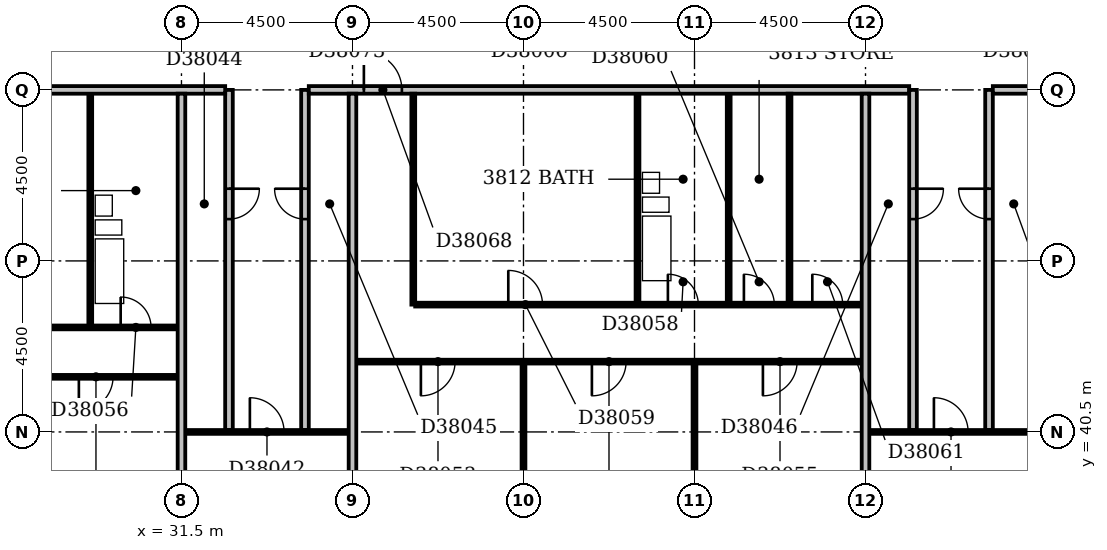
"""IFC4 building model, lengths in metres.
Left out: names, types, materials, properties, quantities, classifications, styles, units other than length and angle.
Written with IfcOpenShell. Run it as: python <this file> out.ifc"""

import sys

from ifc_helpers import new_model, si_unit, direction, frame, frame_2d, origin, place, context, subcontext, project, spatial, rectangle, extrude, element, fill, save


model = new_model("IFC4")
c1 = context("Model", 3, precision=1e-05, world=origin(), true_north=direction((0.0, 1.0)))
c2 = subcontext(c1, "Body", "Model", "MODEL_VIEW")
j1 = project(units=[si_unit("LENGTHUNIT", "METRE"), si_unit("PLANEANGLEUNIT", "RADIAN")], contexts=[c1])
p1 = place(None, origin())
s1 = spatial("IfcSite", under=j1, at=p1, CompositionType="ELEMENT")
p2 = place(p1, origin())
s2 = spatial("IfcBuilding", under=s1, at=p2, CompositionType="ELEMENT")
p3 = place(p2, frame((0.0, 0.0, 152.0)))
s3 = spatial("IfcBuildingStorey", under=s2, at=p3, CompositionType="ELEMENT", Elevation=152.0)
p4 = place(p3, frame((31.5, 36.5, 0.0), z_axis=(0.0, 0.0, 1.0), x_axis=(0.0, 1.0, 0.0)))
e1 = element("IfcWall", 1, at=p4, inside=s3, PredefinedType="PARTITIONING", context=c2, shape_type="SweptSolid", body=[
    extrude(rectangle(XDim=12.9, YDim=0.2, at=frame_2d((6.45, 0.0))), origin(), (0.0, 0.0, 1.0), 3.3),
])
p5 = place(p3, frame((36.0, 36.5, 0.0), z_axis=(0.0, 0.0, 1.0), x_axis=(0.0, 1.0, 0.0)))
e2 = element("IfcWall", 2, at=p5, inside=s3, PredefinedType="PARTITIONING", context=c2, shape_type="SweptSolid", body=[
    extrude(rectangle(XDim=12.9, YDim=0.2, at=frame_2d((6.45, 0.0))), origin(), (0.0, 0.0, 1.0), 2.4),
])
p6 = place(p3, frame((40.5, 36.5, 0.0), z_axis=(0.0, 0.0, 1.0), x_axis=(0.0, 1.0, 0.0)))
e3 = element("IfcWall", 3, at=p6, inside=s3, PredefinedType="PARTITIONING", context=c2, shape_type="SweptSolid", body=[
    extrude(rectangle(XDim=5.8, YDim=0.1, at=frame_2d((2.9, 0.0))), origin(), (0.0, 0.0, 1.0), 3.3),
])
p7 = place(p3, frame((45.0, 36.5, 0.0), z_axis=(0.0, 0.0, 1.0), x_axis=(0.0, 1.0, 0.0)))
e4 = element("IfcWall", 4, at=p7, inside=s3, PredefinedType="PARTITIONING", context=c2, shape_type="SweptSolid", body=[
    extrude(rectangle(XDim=5.8, YDim=0.1, at=frame_2d((2.9, 0.0))), origin(), (0.0, 0.0, 1.0), 2.6),
])
p8 = place(p3, frame((49.5, 36.5, 0.0), z_axis=(0.0, 0.0, 1.0), x_axis=(0.0, 1.0, 0.0)))
e5 = element("IfcWall", 5, at=p8, inside=s3, PredefinedType="PARTITIONING", context=c2, shape_type="SweptSolid", body=[
    extrude(rectangle(XDim=12.9, YDim=0.2, at=frame_2d((6.45, 0.0))), origin(), (0.0, 0.0, 1.0), 3.3),
])
p9 = place(p3, frame((31.6, 40.5, 0.0), z_axis=(0.0, 0.0, 1.0), x_axis=(1.0, 0.0, 0.0)))
e6 = element("IfcWall", 6, at=p9, inside=s3, PredefinedType="PARTITIONING", context=c2, shape_type="SweptSolid", body=[
    extrude(rectangle(XDim=4.3, YDim=0.1, at=frame_2d((2.15, 0.0))), origin(), (0.0, 0.0, 1.0), 3.3),
])
p10 = place(p9, frame((1.7, 0.0, 0.0)))
e7 = element("IfcOpeningElement", 7, at=p10, cuts=e6, PredefinedType="OPENING", context=c2, shape_type="SweptSolid", body=[
    extrude(rectangle(XDim=0.9, YDim=2.1, at=frame_2d((0.45, 1.05))), frame((0.0, 0.062, 0.0), z_axis=(0.0, -1.0, 0.0), x_axis=(1.0, 0.0, 0.0)), (0.0, 0.0, 1.0), 0.124),
])
p11 = place(p3, frame((49.6, 40.5, 0.0), z_axis=(0.0, 0.0, 1.0), x_axis=(1.0, 0.0, 0.0)))
e8 = element("IfcWall", 8, at=p11, inside=s3, PredefinedType="PARTITIONING", context=c2, shape_type="SweptSolid", body=[
    extrude(rectangle(XDim=4.3, YDim=0.1, at=frame_2d((2.15, 0.0))), origin(), (0.0, 0.0, 1.0), 3.3),
])
p12 = place(p11, frame((1.7, 0.0, 0.0)))
e9 = element("IfcOpeningElement", 9, at=p12, cuts=e8, PredefinedType="OPENING", context=c2, shape_type="SweptSolid", body=[
    extrude(rectangle(XDim=0.9, YDim=2.1, at=frame_2d((0.45, 1.05))), frame((0.0, 0.062, 0.0), z_axis=(0.0, -1.0, 0.0), x_axis=(1.0, 0.0, 0.0)), (0.0, 0.0, 1.0), 0.124),
])
p13 = place(p3, frame((32.75, 40.55, 0.0), z_axis=(0.0, 0.0, 1.0), x_axis=(0.0, 1.0, 0.0)))
e10 = element("IfcWall", 10, at=p13, inside=s3, PredefinedType="PARTITIONING", context=c2, shape_type="SweptSolid", body=[
    extrude(rectangle(XDim=8.95, YDim=0.2, at=frame_2d((4.475, 0.0))), origin(), (0.0, 0.0, 1.0), 3.3),
])
p14 = place(p13, frame((5.55, 0.0, 0.0)))
e11 = element("IfcOpeningElement", 11, at=p14, cuts=e10, PredefinedType="OPENING", context=c2, shape_type="SweptSolid", body=[
    extrude(rectangle(XDim=0.8, YDim=2.1, at=frame_2d((0.4, 1.05))), frame((0.0, 0.112, 0.0), z_axis=(0.0, -1.0, 0.0), x_axis=(1.0, 0.0, 0.0)), (0.0, 0.0, 1.0), 0.224),
])
p15 = place(p3, frame((34.75, 40.55, 0.0), z_axis=(0.0, 0.0, 1.0), x_axis=(0.0, 1.0, 0.0)))
e12 = element("IfcWall", 12, at=p15, inside=s3, PredefinedType="PARTITIONING", context=c2, shape_type="SweptSolid", body=[
    extrude(rectangle(XDim=8.95, YDim=0.2, at=frame_2d((4.475, 0.0))), origin(), (0.0, 0.0, 1.0), 3.3),
])
p16 = place(p15, frame((5.55, 0.0, 0.0)))
e13 = element("IfcOpeningElement", 13, at=p16, cuts=e12, PredefinedType="OPENING", context=c2, shape_type="SweptSolid", body=[
    extrude(rectangle(XDim=0.8, YDim=2.1, at=frame_2d((0.4, 1.05))), frame((0.0, 0.112, 0.0), z_axis=(0.0, -1.0, 0.0), x_axis=(1.0, 0.0, 0.0)), (0.0, 0.0, 1.0), 0.224),
])
p17 = place(p3, frame((50.75, 40.55, 0.0), z_axis=(0.0, 0.0, 1.0), x_axis=(0.0, 1.0, 0.0)))
e14 = element("IfcWall", 14, at=p17, inside=s3, PredefinedType="PARTITIONING", context=c2, shape_type="SweptSolid", body=[
    extrude(rectangle(XDim=8.95, YDim=0.2, at=frame_2d((4.475, 0.0))), origin(), (0.0, 0.0, 1.0), 3.3),
])
p18 = place(p17, frame((5.55, 0.0, 0.0)))
e15 = element("IfcOpeningElement", 15, at=p18, cuts=e14, PredefinedType="OPENING", context=c2, shape_type="SweptSolid", body=[
    extrude(rectangle(XDim=0.8, YDim=2.1, at=frame_2d((0.4, 1.05))), frame((0.0, 0.112, 0.0), z_axis=(0.0, -1.0, 0.0), x_axis=(1.0, 0.0, 0.0)), (0.0, 0.0, 1.0), 0.224),
])
p19 = place(p3, frame((52.75, 40.55, 0.0), z_axis=(0.0, 0.0, 1.0), x_axis=(0.0, 1.0, 0.0)))
e16 = element("IfcWall", 16, at=p19, inside=s3, PredefinedType="PARTITIONING", context=c2, shape_type="SweptSolid", body=[
    extrude(rectangle(XDim=8.95, YDim=0.2, at=frame_2d((4.475, 0.0))), origin(), (0.0, 0.0, 1.0), 3.3),
])
p20 = place(p19, frame((5.55, 0.0, 0.0)))
e17 = element("IfcOpeningElement", 17, at=p20, cuts=e16, PredefinedType="OPENING", context=c2, shape_type="SweptSolid", body=[
    extrude(rectangle(XDim=0.8, YDim=2.1, at=frame_2d((0.4, 1.05))), frame((0.0, 0.112, 0.0), z_axis=(0.0, -1.0, 0.0), x_axis=(1.0, 0.0, 0.0)), (0.0, 0.0, 1.0), 0.224),
])
p21 = place(p3, frame((22.6, 41.95, 0.0), z_axis=(0.0, 0.0, 1.0), x_axis=(1.0, 0.0, 0.0)))
e18 = element("IfcWall", 18, at=p21, inside=s3, PredefinedType="PARTITIONING", context=c2, shape_type="SweptSolid", body=[
    extrude(rectangle(XDim=8.8, YDim=0.1, at=frame_2d((4.4, 0.0))), origin(), (0.0, 0.0, 1.0), 3.3),
])
p22 = place(p21, frame((1.7, 0.0, 0.0)))
e19 = element("IfcOpeningElement", 19, at=p22, cuts=e18, PredefinedType="OPENING", context=c2, shape_type="SweptSolid", body=[
    extrude(rectangle(XDim=0.9, YDim=2.1, at=frame_2d((0.45, 1.05))), frame((0.0, 0.062, 0.0), z_axis=(0.0, -1.0, 0.0), x_axis=(1.0, 0.0, 0.0)), (0.0, 0.0, 1.0), 0.124),
])
p23 = place(p21, frame((6.2, 0.0, 0.0)))
e20 = element("IfcOpeningElement", 20, at=p23, cuts=e18, PredefinedType="OPENING", context=c2, shape_type="SweptSolid", body=[
    extrude(rectangle(XDim=0.9, YDim=2.1, at=frame_2d((0.45, 1.05))), frame((0.0, 0.062, 0.0), z_axis=(0.0, -1.0, 0.0), x_axis=(1.0, 0.0, 0.0)), (0.0, 0.0, 1.0), 0.124),
])
p24 = place(p3, frame((36.1, 42.35, 0.0), z_axis=(0.0, 0.0, 1.0), x_axis=(1.0, 0.0, 0.0)))
e21 = element("IfcWall", 21, at=p24, inside=s3, PredefinedType="PARTITIONING", context=c2, shape_type="SweptSolid", body=[
    extrude(rectangle(XDim=13.3, YDim=0.1, at=frame_2d((6.65, 0.0))), origin(), (0.0, 0.0, 1.0), 3.3),
])
p25 = place(p24, frame((1.7, 0.0, 0.0)))
e22 = element("IfcOpeningElement", 22, at=p25, cuts=e21, PredefinedType="OPENING", context=c2, shape_type="SweptSolid", body=[
    extrude(rectangle(XDim=0.9, YDim=2.1, at=frame_2d((0.45, 1.05))), frame((0.0, 0.062, 0.0), z_axis=(0.0, -1.0, 0.0), x_axis=(1.0, 0.0, 0.0)), (0.0, 0.0, 1.0), 0.124),
])
p26 = place(p24, frame((6.2, 0.0, 0.0)))
e23 = element("IfcOpeningElement", 23, at=p26, cuts=e21, PredefinedType="OPENING", context=c2, shape_type="SweptSolid", body=[
    extrude(rectangle(XDim=0.9, YDim=2.1, at=frame_2d((0.45, 1.05))), frame((0.0, 0.062, 0.0), z_axis=(0.0, -1.0, 0.0), x_axis=(1.0, 0.0, 0.0)), (0.0, 0.0, 1.0), 0.124),
])
p27 = place(p24, frame((10.7, 0.0, 0.0)))
e24 = element("IfcOpeningElement", 24, at=p27, cuts=e21, PredefinedType="OPENING", context=c2, shape_type="SweptSolid", body=[
    extrude(rectangle(XDim=0.9, YDim=2.1, at=frame_2d((0.45, 1.05))), frame((0.0, 0.062, 0.0), z_axis=(0.0, -1.0, 0.0), x_axis=(1.0, 0.0, 0.0)), (0.0, 0.0, 1.0), 0.124),
])
p28 = place(p3, frame((24.15, 43.25, 0.0), z_axis=(0.0, 0.0, 1.0), x_axis=(1.0, 0.0, 0.0)))
e25 = element("IfcWall", 25, at=p28, inside=s3, PredefinedType="PARTITIONING", context=c2, shape_type="SweptSolid", body=[
    extrude(rectangle(XDim=7.25, YDim=0.1, at=frame_2d((3.625, 0.0))), origin(), (0.0, 0.0, 1.0), 3.3),
])
p29 = place(p28, frame((5.75, 0.0, 0.0)))
e26 = element("IfcOpeningElement", 26, at=p29, cuts=e25, PredefinedType="OPENING", context=c2, shape_type="SweptSolid", body=[
    extrude(rectangle(XDim=0.8, YDim=2.1, at=frame_2d((0.4, 1.05))), frame((0.0, 0.062, 0.0), z_axis=(0.0, -1.0, 0.0), x_axis=(1.0, 0.0, 0.0)), (0.0, 0.0, 1.0), 0.124),
])
p30 = place(p28, frame((2.0, 0.0, 0.0)))
e27 = element("IfcOpeningElement", 27, at=p30, cuts=e25, PredefinedType="OPENING", context=c2, shape_type="SweptSolid", body=[
    extrude(rectangle(XDim=0.9, YDim=2.1, at=frame_2d((0.45, 1.05))), frame((0.0, 0.062, 0.0), z_axis=(0.0, -1.0, 0.0), x_axis=(1.0, 0.0, 0.0)), (0.0, 0.0, 1.0), 0.124),
])
p31 = place(p3, frame((29.1, 43.3, 0.0), z_axis=(0.0, 0.0, 1.0), x_axis=(0.0, 1.0, 0.0)))
e28 = element("IfcWall", 28, at=p31, inside=s3, PredefinedType="PLUMBINGWALL", context=c2, shape_type="SweptSolid", body=[
    extrude(rectangle(XDim=6.1, YDim=0.1, at=frame_2d((3.05, 0.0))), origin(), (0.0, 0.0, 1.0), 3.3),
])
p32 = place(p3, frame((37.6, 43.85, 0.0), z_axis=(0.0, 0.0, 1.0), x_axis=(0.0, 1.0, 0.0)))
e29 = element("IfcWall", 29, at=p32, inside=s3, PredefinedType="PARTITIONING", context=c2, shape_type="SweptSolid", body=[
    extrude(rectangle(XDim=5.55, YDim=0.1, at=frame_2d((2.775, 0.0))), origin(), (0.0, 0.0, 1.0), 3.3),
])
p33 = place(p3, frame((37.65, 43.85, 0.0), z_axis=(0.0, 0.0, 1.0), x_axis=(1.0, 0.0, 0.0)))
e30 = element("IfcWall", 30, at=p33, inside=s3, PredefinedType="PARTITIONING", context=c2, shape_type="SweptSolid", body=[
    extrude(rectangle(XDim=11.75, YDim=0.1, at=frame_2d((5.875, 0.0))), origin(), (0.0, 0.0, 1.0), 3.3),
])
p34 = place(p33, frame((6.65, 0.0, 0.0)))
e31 = element("IfcOpeningElement", 31, at=p34, cuts=e30, PredefinedType="OPENING", context=c2, shape_type="SweptSolid", body=[
    extrude(rectangle(XDim=0.8, YDim=2.1, at=frame_2d((0.4, 1.05))), frame((0.0, 0.062, 0.0), z_axis=(0.0, -1.0, 0.0), x_axis=(1.0, 0.0, 0.0)), (0.0, 0.0, 1.0), 0.124),
])
p35 = place(p33, frame((2.45, 0.0, 0.0)))
e32 = element("IfcOpeningElement", 32, at=p35, cuts=e30, PredefinedType="OPENING", context=c2, shape_type="SweptSolid", body=[
    extrude(rectangle(XDim=0.9, YDim=2.1, at=frame_2d((0.45, 1.05))), frame((0.0, 0.062, 0.0), z_axis=(0.0, -1.0, 0.0), x_axis=(1.0, 0.0, 0.0)), (0.0, 0.0, 1.0), 0.124),
])
p36 = place(p33, frame((8.65, 0.0, 0.0)))
e33 = element("IfcOpeningElement", 33, at=p36, cuts=e30, PredefinedType="OPENING", context=c2, shape_type="SweptSolid", body=[
    extrude(rectangle(XDim=0.8, YDim=2.1, at=frame_2d((0.4, 1.05))), frame((0.0, 0.062, 0.0), z_axis=(0.0, -1.0, 0.0), x_axis=(1.0, 0.0, 0.0)), (0.0, 0.0, 1.0), 0.124),
])
p37 = place(p33, frame((10.45, 0.0, 0.0)))
e34 = element("IfcOpeningElement", 34, at=p37, cuts=e30, PredefinedType="OPENING", context=c2, shape_type="SweptSolid", body=[
    extrude(rectangle(XDim=0.8, YDim=2.1, at=frame_2d((0.4, 1.05))), frame((0.0, 0.062, 0.0), z_axis=(0.0, -1.0, 0.0), x_axis=(1.0, 0.0, 0.0)), (0.0, 0.0, 1.0), 0.124),
])
for number, where, z_axis, x_axis in (
    (35, (43.5, 43.9, 0.0), (0.0, 0.0, 1.0), (0.0, 1.0, 0.0)),
    (36, (45.9, 43.9, 0.0), (0.0, 0.0, 1.0), (0.0, 1.0, 0.0)),
):
    element("IfcWall", number, at=place(p3, frame(where, z_axis=z_axis, x_axis=x_axis)), inside=s3, PredefinedType="PLUMBINGWALL", context=c2, shape_type="SweptSolid", body=[
        extrude(rectangle(XDim=5.5, YDim=0.1, at=frame_2d((2.75, 0.0))), origin(), (0.0, 0.0, 1.0), 3.3),
    ])
p38 = place(p3, frame((47.5, 43.9, 0.0), z_axis=(0.0, 0.0, 1.0), x_axis=(0.0, 1.0, 0.0)))
e37 = element("IfcWall", 37, at=p38, inside=s3, PredefinedType="PARTITIONING", context=c2, shape_type="SweptSolid", body=[
    extrude(rectangle(XDim=5.5, YDim=0.1, at=frame_2d((2.75, 0.0))), origin(), (0.0, 0.0, 1.0), 3.3),
])
p39 = place(p3, frame((9.1, 49.5, 0.0), z_axis=(0.0, 0.0, 1.0), x_axis=(1.0, 0.0, 0.0)))
e38 = element("IfcWall", 38, at=p39, inside=s3, PredefinedType="PARTITIONING", context=c2, shape_type="SweptSolid", body=[
    extrude(rectangle(XDim=23.55, YDim=0.2, at=frame_2d((11.775, 0.0))), origin(), (0.0, 0.0, 1.0), 3.3),
])
p40 = place(p39, frame((13.7, 0.0, 0.0)))
e39 = element("IfcOpeningElement", 39, at=p40, cuts=e38, PredefinedType="OPENING", context=c2, shape_type="SweptSolid", body=[
    extrude(rectangle(XDim=1.0, YDim=2.1, at=frame_2d((0.5, 1.05))), frame((0.0, 0.112, 0.0), z_axis=(0.0, -1.0, 0.0), x_axis=(1.0, 0.0, 0.0)), (0.0, 0.0, 1.0), 0.224),
])
p41 = place(p39, frame((10.65, 0.0, 0.0)))
e40 = element("IfcOpeningElement", 40, at=p41, cuts=e38, PredefinedType="OPENING", context=c2, shape_type="SweptSolid", body=[
    extrude(rectangle(XDim=0.9, YDim=2.1, at=frame_2d((0.45, 1.05))), frame((0.0, 0.112, 0.0), z_axis=(0.0, -1.0, 0.0), x_axis=(1.0, 0.0, 0.0)), (0.0, 0.0, 1.0), 0.224),
])
p42 = place(p3, frame((34.85, 49.5, 0.0), z_axis=(0.0, 0.0, 1.0), x_axis=(1.0, 0.0, 0.0)))
e41 = element("IfcWall", 41, at=p42, inside=s3, PredefinedType="PARTITIONING", context=c2, shape_type="SweptSolid", body=[
    extrude(rectangle(XDim=15.8, YDim=0.2, at=frame_2d((7.9, 0.0))), origin(), (0.0, 0.0, 1.0), 3.3),
])
p43 = place(p42, frame((1.45, 0.0, 0.0)))
e42 = element("IfcOpeningElement", 42, at=p43, cuts=e41, PredefinedType="OPENING", context=c2, shape_type="SweptSolid", body=[
    extrude(rectangle(XDim=1.0, YDim=2.1, at=frame_2d((0.5, 1.05))), frame((0.0, 0.112, 0.0), z_axis=(0.0, -1.0, 0.0), x_axis=(1.0, 0.0, 0.0)), (0.0, 0.0, 1.0), 0.224),
])
p44 = place(p3, frame((52.85, 49.5, 0.0), z_axis=(0.0, 0.0, 1.0), x_axis=(1.0, 0.0, 0.0)))
e43 = element("IfcWall", 43, at=p44, inside=s3, PredefinedType="PARTITIONING", context=c2, shape_type="SweptSolid", body=[
    extrude(rectangle(XDim=14.15, YDim=0.2, at=frame_2d((7.075, 0.0))), origin(), (0.0, 0.0, 1.0), 3.3),
])
p45 = place(p44, frame((1.45, 0.0, 0.0)))
e44 = element("IfcOpeningElement", 44, at=p45, cuts=e43, PredefinedType="OPENING", context=c2, shape_type="SweptSolid", body=[
    extrude(rectangle(XDim=1.0, YDim=2.1, at=frame_2d((0.5, 1.05))), frame((0.0, 0.112, 0.0), z_axis=(0.0, -1.0, 0.0), x_axis=(1.0, 0.0, 0.0)), (0.0, 0.0, 1.0), 0.224),
])
p46 = place(p10, origin())
e45 = element("IfcDoor", 45, at=p46, inside=s3, OperationType="SINGLE_SWING_LEFT", PredefinedType="DOOR", context=c2, shape_type="SweptSolid", body=[
    extrude(rectangle(XDim=0.9, YDim=2.1, at=frame_2d((0.45, 1.05))), frame((0.0, 0.025, 0.0), z_axis=(0.0, -1.0, 0.0), x_axis=(1.0, 0.0, 0.0)), (0.0, 0.0, 1.0), 0.05),
])
fill(e7, e45)
p47 = place(p12, origin())
e46 = element("IfcDoor", 46, at=p47, inside=s3, OperationType="SINGLE_SWING_LEFT", PredefinedType="DOOR", context=c2, shape_type="SweptSolid", body=[
    extrude(rectangle(XDim=0.9, YDim=2.1, at=frame_2d((0.45, 1.05))), frame((0.0, 0.025, 0.0), z_axis=(0.0, -1.0, 0.0), x_axis=(1.0, 0.0, 0.0)), (0.0, 0.0, 1.0), 0.05),
])
fill(e9, e46)
p48 = place(p14, origin())
e47 = element("IfcDoor", 47, at=p48, inside=s3, OperationType="SINGLE_SWING_RIGHT", PredefinedType="DOOR", context=c2, shape_type="SweptSolid", body=[
    extrude(rectangle(XDim=0.8, YDim=2.1, at=frame_2d((0.4, 1.05))), frame((0.0, 0.025, 0.0), z_axis=(0.0, -1.0, 0.0), x_axis=(1.0, 0.0, 0.0)), (0.0, 0.0, 1.0), 0.05),
])
fill(e11, e47)
p49 = place(p16, frame((0.8, 0.0, 0.0), z_axis=(0.0, 0.0, 1.0), x_axis=(-1.0, 0.0, 0.0)))
e48 = element("IfcDoor", 48, at=p49, inside=s3, OperationType="SINGLE_SWING_LEFT", PredefinedType="DOOR", context=c2, shape_type="SweptSolid", body=[
    extrude(rectangle(XDim=0.8, YDim=2.1, at=frame_2d((0.4, 1.05))), frame((0.0, 0.025, 0.0), z_axis=(0.0, -1.0, 0.0), x_axis=(1.0, 0.0, 0.0)), (0.0, 0.0, 1.0), 0.05),
])
fill(e13, e48)
p50 = place(p18, origin())
e49 = element("IfcDoor", 49, at=p50, inside=s3, OperationType="SINGLE_SWING_RIGHT", PredefinedType="DOOR", context=c2, shape_type="SweptSolid", body=[
    extrude(rectangle(XDim=0.8, YDim=2.1, at=frame_2d((0.4, 1.05))), frame((0.0, 0.025, 0.0), z_axis=(0.0, -1.0, 0.0), x_axis=(1.0, 0.0, 0.0)), (0.0, 0.0, 1.0), 0.05),
])
fill(e15, e49)
p51 = place(p20, frame((0.8, 0.0, 0.0), z_axis=(0.0, 0.0, 1.0), x_axis=(-1.0, 0.0, 0.0)))
e50 = element("IfcDoor", 50, at=p51, inside=s3, OperationType="SINGLE_SWING_LEFT", PredefinedType="DOOR", context=c2, shape_type="SweptSolid", body=[
    extrude(rectangle(XDim=0.8, YDim=2.1, at=frame_2d((0.4, 1.05))), frame((0.0, 0.025, 0.0), z_axis=(0.0, -1.0, 0.0), x_axis=(1.0, 0.0, 0.0)), (0.0, 0.0, 1.0), 0.05),
])
fill(e17, e50)
p52 = place(p23, frame((0.9, 0.0, 0.0), z_axis=(0.0, 0.0, 1.0), x_axis=(-1.0, 0.0, 0.0)))
e51 = element("IfcDoor", 51, at=p52, inside=s3, OperationType="SINGLE_SWING_RIGHT", PredefinedType="DOOR", context=c2, shape_type="SweptSolid", body=[
    extrude(rectangle(XDim=0.9, YDim=2.1, at=frame_2d((0.45, 1.05))), frame((0.0, 0.025, 0.0), z_axis=(0.0, -1.0, 0.0), x_axis=(1.0, 0.0, 0.0)), (0.0, 0.0, 1.0), 0.05),
])
fill(e20, e51)
p53 = place(p25, frame((0.9, 0.0, 0.0), z_axis=(0.0, 0.0, 1.0), x_axis=(-1.0, 0.0, 0.0)))
e52 = element("IfcDoor", 52, at=p53, inside=s3, OperationType="SINGLE_SWING_RIGHT", PredefinedType="DOOR", context=c2, shape_type="SweptSolid", body=[
    extrude(rectangle(XDim=0.9, YDim=2.1, at=frame_2d((0.45, 1.05))), frame((0.0, 0.025, 0.0), z_axis=(0.0, -1.0, 0.0), x_axis=(1.0, 0.0, 0.0)), (0.0, 0.0, 1.0), 0.05),
])
fill(e22, e52)
p54 = place(p26, frame((0.9, 0.0, 0.0), z_axis=(0.0, 0.0, 1.0), x_axis=(-1.0, 0.0, 0.0)))
e53 = element("IfcDoor", 53, at=p54, inside=s3, OperationType="SINGLE_SWING_RIGHT", PredefinedType="DOOR", context=c2, shape_type="SweptSolid", body=[
    extrude(rectangle(XDim=0.9, YDim=2.1, at=frame_2d((0.45, 1.05))), frame((0.0, 0.025, 0.0), z_axis=(0.0, -1.0, 0.0), x_axis=(1.0, 0.0, 0.0)), (0.0, 0.0, 1.0), 0.05),
])
fill(e23, e53)
p55 = place(p27, frame((0.9, 0.0, 0.0), z_axis=(0.0, 0.0, 1.0), x_axis=(-1.0, 0.0, 0.0)))
e54 = element("IfcDoor", 54, at=p55, inside=s3, OperationType="SINGLE_SWING_RIGHT", PredefinedType="DOOR", context=c2, shape_type="SweptSolid", body=[
    extrude(rectangle(XDim=0.9, YDim=2.1, at=frame_2d((0.45, 1.05))), frame((0.0, 0.025, 0.0), z_axis=(0.0, -1.0, 0.0), x_axis=(1.0, 0.0, 0.0)), (0.0, 0.0, 1.0), 0.05),
])
fill(e24, e54)
p56 = place(p29, origin())
e55 = element("IfcDoor", 55, at=p56, inside=s3, OperationType="SINGLE_SWING_LEFT", PredefinedType="DOOR", context=c2, shape_type="SweptSolid", body=[
    extrude(rectangle(XDim=0.8, YDim=2.1, at=frame_2d((0.4, 1.05))), frame((0.0, 0.025, 0.0), z_axis=(0.0, -1.0, 0.0), x_axis=(1.0, 0.0, 0.0)), (0.0, 0.0, 1.0), 0.05),
])
fill(e26, e55)
p57 = place(p34, origin())
e56 = element("IfcDoor", 56, at=p57, inside=s3, OperationType="SINGLE_SWING_LEFT", PredefinedType="DOOR", context=c2, shape_type="SweptSolid", body=[
    extrude(rectangle(XDim=0.8, YDim=2.1, at=frame_2d((0.4, 1.05))), frame((0.0, 0.025, 0.0), z_axis=(0.0, -1.0, 0.0), x_axis=(1.0, 0.0, 0.0)), (0.0, 0.0, 1.0), 0.05),
])
fill(e31, e56)
p58 = place(p35, origin())
e57 = element("IfcDoor", 57, at=p58, inside=s3, OperationType="SINGLE_SWING_LEFT", PredefinedType="DOOR", context=c2, shape_type="SweptSolid", body=[
    extrude(rectangle(XDim=0.9, YDim=2.1, at=frame_2d((0.45, 1.05))), frame((0.0, 0.025, 0.0), z_axis=(0.0, -1.0, 0.0), x_axis=(1.0, 0.0, 0.0)), (0.0, 0.0, 1.0), 0.05),
])
fill(e32, e57)
p59 = place(p36, origin())
e58 = element("IfcDoor", 58, at=p59, inside=s3, OperationType="SINGLE_SWING_LEFT", PredefinedType="DOOR", context=c2, shape_type="SweptSolid", body=[
    extrude(rectangle(XDim=0.8, YDim=2.1, at=frame_2d((0.4, 1.05))), frame((0.0, 0.025, 0.0), z_axis=(0.0, -1.0, 0.0), x_axis=(1.0, 0.0, 0.0)), (0.0, 0.0, 1.0), 0.05),
])
fill(e33, e58)
p60 = place(p37, origin())
e59 = element("IfcDoor", 59, at=p60, inside=s3, OperationType="SINGLE_SWING_LEFT", PredefinedType="DOOR", context=c2, shape_type="SweptSolid", body=[
    extrude(rectangle(XDim=0.8, YDim=2.1, at=frame_2d((0.4, 1.05))), frame((0.0, 0.025, 0.0), z_axis=(0.0, -1.0, 0.0), x_axis=(1.0, 0.0, 0.0)), (0.0, 0.0, 1.0), 0.05),
])
fill(e34, e59)
p61 = place(p43, origin())
e60 = element("IfcDoor", 60, at=p61, inside=s3, OperationType="SINGLE_SWING_LEFT", PredefinedType="DOOR", context=c2, shape_type="SweptSolid", body=[
    extrude(rectangle(XDim=1.0, YDim=2.1, at=frame_2d((0.5, 1.05))), frame((0.0, 0.025, 0.0), z_axis=(0.0, -1.0, 0.0), x_axis=(1.0, 0.0, 0.0)), (0.0, 0.0, 1.0), 0.05),
])
fill(e42, e60)
save(model, sys.argv[1])
